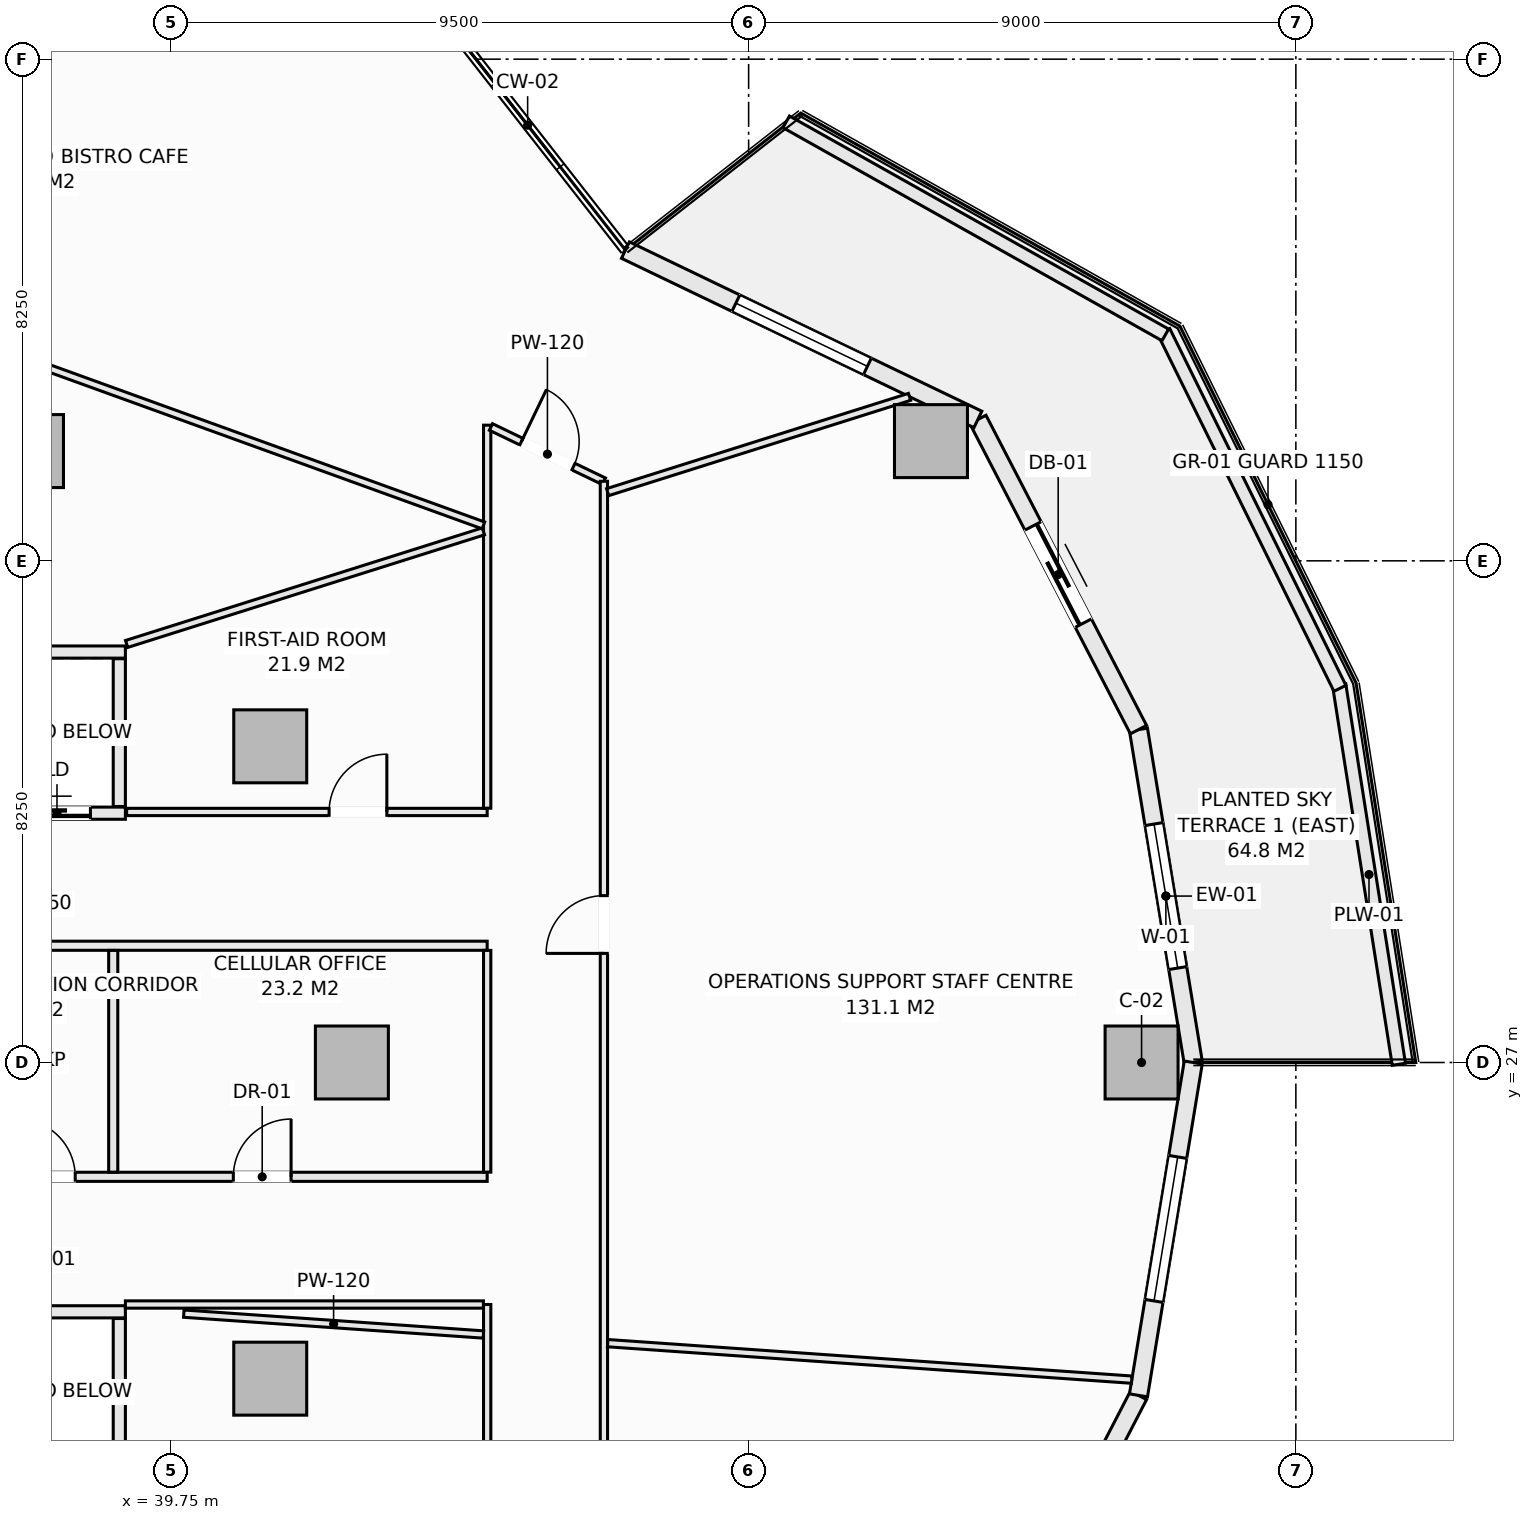
"""IFC4 building model, lengths in metres.
Left out: names, types, materials, properties, quantities, classifications, styles, units other than length and angle.
Written with IfcOpenShell. Run it as: python <this file> out.ifc"""

import sys

from ifc_helpers import new_model, si_unit, direction, frame, frame_2d, origin, origin_2d, place, context, subcontext, project, spatial, rectangle, extrude, element, fill, save


model = new_model("IFC4")
c1 = context("Model", 3, precision=1e-05, world=origin(), true_north=direction((0.0, 1.0)))
c2 = subcontext(c1, "Body", "Model", "MODEL_VIEW")
j1 = project(units=[si_unit("LENGTHUNIT", "METRE"), si_unit("PLANEANGLEUNIT", "RADIAN")], contexts=[c1])
p1 = place(None, origin())
s1 = spatial("IfcSite", under=j1, at=p1, CompositionType="ELEMENT")
p2 = place(p1, origin())
s2 = spatial("IfcBuilding", under=s1, at=p2, CompositionType="ELEMENT")
p3 = place(p2, frame((0.0, 0.0, 84.25)))
s3 = spatial("IfcBuildingStorey", under=s2, at=p3, CompositionType="ELEMENT", Elevation=84.25)
for number, where, z_axis, x_axis in (
    (1, (55.712, 27.0, -0.28), (0.0, 0.0, 1.0), (1.0, 0.0, 0.0)),
    (2, (52.249, 37.219, -0.28), (0.0, 0.0, 1.0), (1.0, 0.0, 0.0)),
    (3, (42.725, 27.0, -0.28), (0.0, 0.0, 1.0), (1.0, 0.0, 0.0)),
    (4, (41.382, 32.199, -0.28), (0.0, 0.0, 1.0), (1.0, 0.0, 0.0)),
    (5, (37.382, 37.055, -0.28), (0.0, 0.0, 1.0), (1.0, 0.0, 0.0)),
    (6, (41.382, 21.801, -0.28), (0.0, 0.0, 1.0), (1.0, 0.0, 0.0)),
):
    element("IfcColumn", number, at=place(p3, frame(where, z_axis=z_axis, x_axis=x_axis)), inside=s3, PredefinedType="COLUMN", context=c2, shape_type="SweptSolid", body=[
        extrude(rectangle(XDim=1.2, YDim=1.2, at=origin_2d()), origin(), (0.0, 0.0, 1.0), 3.85),
    ])
p4 = place(p3, frame((55.662, 32.474, 0.0), z_axis=(0.0, 0.0, 1.0), x_axis=(0.162386212206, -0.986727276447, 0.0)))
e7 = element("IfcWall", 7, at=p4, inside=s3, PredefinedType="SOLIDWALL", context=c2, shape_type="SweptSolid", body=[
    extrude(rectangle(XDim=5.548, YDim=0.3, at=frame_2d((2.774, 0.0))), origin(), (0.0, 0.0, 1.0), 3.093),
])
p5 = place(p4, frame((1.574, 0.0, 0.85)))
e8 = element("IfcOpeningElement", 8, at=p5, cuts=e7, PredefinedType="OPENING", context=c2, shape_type="SweptSolid", body=[
    extrude(rectangle(XDim=2.4, YDim=1.9, at=frame_2d((1.2, 0.95))), frame((0.0, 0.16, 0.0), z_axis=(0.0, -1.0, 0.0), x_axis=(1.0, 0.0, 0.0)), (0.0, 0.0, 1.0), 0.32),
])
p6 = place(p3, frame((53.021, 37.575, 0.0), z_axis=(0.0, 0.0, 1.0), x_axis=(0.459800981414, -0.888021991558, 0.0)))
e9 = element("IfcWall", 9, at=p6, inside=s3, PredefinedType="SOLIDWALL", context=c2, shape_type="SweptSolid", body=[
    extrude(rectangle(XDim=5.744, YDim=0.3, at=frame_2d((2.872, 0.0))), origin(), (0.0, 0.0, 1.0), 3.093),
])
p7 = place(p6, frame((1.972, 0.0, 0.0)))
e10 = element("IfcOpeningElement", 10, at=p7, cuts=e9, PredefinedType="OPENING", context=c2, shape_type="SweptSolid", body=[
    extrude(rectangle(XDim=1.8, YDim=2.25, at=frame_2d((0.9, 1.125))), frame((0.0, 0.16, 0.0), z_axis=(0.0, -1.0, 0.0), x_axis=(1.0, 0.0, 0.0)), (0.0, 0.0, 1.0), 0.32),
])
p8 = place(p3, frame((47.224, 40.36, 0.0), z_axis=(0.0, 0.0, 1.0), x_axis=(0.901354747727, -0.433081538224, 0.0)))
e11 = element("IfcWall", 11, at=p8, inside=s3, PredefinedType="SOLIDWALL", context=c2, shape_type="SweptSolid", body=[
    extrude(rectangle(XDim=6.431, YDim=0.3, at=frame_2d((3.215, 0.0))), origin(), (0.0, 0.0, 1.0), 3.093),
])
p9 = place(p8, frame((2.015, 0.0, 0.85)))
e12 = element("IfcOpeningElement", 12, at=p9, cuts=e11, PredefinedType="OPENING", context=c2, shape_type="SweptSolid", body=[
    extrude(rectangle(XDim=2.4, YDim=1.9, at=frame_2d((1.2, 0.95))), frame((0.0, 0.16, 0.0), z_axis=(0.0, -1.0, 0.0), x_axis=(1.0, 0.0, 0.0)), (0.0, 0.0, 1.0), 0.32),
])
p10 = place(p3, frame((53.021, 16.425, 0.0), z_axis=(0.0, 0.0, 1.0), x_axis=(0.459800981414, 0.888021991558, 0.0)))
e13 = element("IfcWall", 13, at=p10, inside=s3, PredefinedType="SOLIDWALL", context=c2, shape_type="SweptSolid", body=[
    extrude(rectangle(XDim=5.744, YDim=0.3, at=frame_2d((2.872, 0.0))), origin(), (0.0, 0.0, 1.0), 3.093),
])
p11 = place(p10, frame((1.672, 0.0, 0.85)))
e14 = element("IfcOpeningElement", 14, at=p11, cuts=e13, PredefinedType="OPENING", context=c2, shape_type="SweptSolid", body=[
    extrude(rectangle(XDim=2.4, YDim=1.9, at=frame_2d((1.2, 0.95))), frame((0.0, 0.16, 0.0), z_axis=(0.0, -1.0, 0.0), x_axis=(1.0, 0.0, 0.0)), (0.0, 0.0, 1.0), 0.32),
])
p12 = place(p3, frame((55.662, 21.526, 0.0), z_axis=(0.0, 0.0, 1.0), x_axis=(0.162386212206, 0.986727276447, 0.0)))
e15 = element("IfcWall", 15, at=p12, inside=s3, PredefinedType="SOLIDWALL", context=c2, shape_type="SweptSolid", body=[
    extrude(rectangle(XDim=5.548, YDim=0.3, at=frame_2d((2.774, 0.0))), origin(), (0.0, 0.0, 1.0), 3.093),
])
p13 = place(p12, frame((1.574, 0.0, 0.85)))
e16 = element("IfcOpeningElement", 16, at=p13, cuts=e15, PredefinedType="OPENING", context=c2, shape_type="SweptSolid", body=[
    extrude(rectangle(XDim=2.4, YDim=1.9, at=frame_2d((1.2, 0.95))), frame((0.0, 0.16, 0.0), z_axis=(0.0, -1.0, 0.0), x_axis=(1.0, 0.0, 0.0)), (0.0, 0.0, 1.0), 0.32),
])
p14 = place(p3, frame((58.962, 33.212, 0.0), z_axis=(0.0, 0.0, 1.0), x_axis=(0.15545655238, -0.987842730561, 0.0)))
e17 = element("IfcWall", 17, at=p14, inside=s3, PredefinedType="PARAPET", context=c2, shape_type="SweptSolid", body=[
    extrude(rectangle(XDim=6.318, YDim=0.22, at=frame_2d((3.159, 0.0))), origin(), (0.0, 0.0, 1.0), 0.52),
])
p15 = place(p3, frame((56.077, 39.021, 0.0), z_axis=(0.0, 0.0, 1.0), x_axis=(0.442686636348, -0.89667638644, 0.0)))
e18 = element("IfcWall", 18, at=p15, inside=s3, PredefinedType="PARAPET", context=c2, shape_type="SweptSolid", body=[
    extrude(rectangle(XDim=6.545, YDim=0.22, at=frame_2d((3.272, 0.0))), origin(), (0.0, 0.0, 1.0), 0.52),
])
p16 = place(p3, frame((49.868, 42.469, 0.0), z_axis=(0.0, 0.0, 1.0), x_axis=(0.871775109335, -0.489906275468, 0.0)))
e19 = element("IfcWall", 19, at=p16, inside=s3, PredefinedType="PARAPET", context=c2, shape_type="SweptSolid", body=[
    extrude(rectangle(XDim=7.152, YDim=0.22, at=frame_2d((3.576, 0.0))), origin(), (0.0, 0.0, 1.0), 0.52),
])
p17 = place(p3, frame((36.75, 33.75, 0.0), z_axis=(0.0, 0.0, 1.0), x_axis=(1.0, 0.0, 0.0)))
e20 = element("IfcWall", 20, at=p17, inside=s3, PredefinedType="SOLIDWALL", context=c2, shape_type="SweptSolid", body=[
    extrude(rectangle(XDim=2.25, YDim=0.2, at=frame_2d((1.125, 0.0))), origin(), (0.0, 0.0, 1.0), 3.57),
])
p18 = place(p3, frame((36.75, 31.1, 0.0), z_axis=(0.0, 0.0, 1.0), x_axis=(1.0, 0.0, 0.0)))
e21 = element("IfcWall", 21, at=p18, inside=s3, PredefinedType="SOLIDWALL", context=c2, shape_type="SweptSolid", body=[
    extrude(rectangle(XDim=2.25, YDim=0.2, at=frame_2d((1.125, 0.0))), origin(), (0.0, 0.0, 1.0), 3.57),
])
p19 = place(p18, frame((0.575, 0.0, 0.0)))
e22 = element("IfcOpeningElement", 22, at=p19, cuts=e21, PredefinedType="OPENING", context=c2, shape_type="SweptSolid", body=[
    extrude(rectangle(XDim=1.1, YDim=2.2, at=frame_2d((0.55, 1.1))), frame((0.0, 0.11, 0.0), z_axis=(0.0, -1.0, 0.0), x_axis=(1.0, 0.0, 0.0)), (0.0, 0.0, 1.0), 0.22),
])
p20 = place(p3, frame((38.9, 31.21, 0.0), z_axis=(0.0, 0.0, 1.0), x_axis=(0.0, 1.0, 0.0)))
e23 = element("IfcWall", 23, at=p20, inside=s3, PredefinedType="SOLIDWALL", context=c2, shape_type="SweptSolid", body=[
    extrude(rectangle(XDim=2.43, YDim=0.2, at=frame_2d((1.215, 0.0))), origin(), (0.0, 0.0, 1.0), 3.57),
])
p21 = place(p3, frame((36.75, 22.9, 0.0), z_axis=(0.0, 0.0, 1.0), x_axis=(1.0, 0.0, 0.0)))
e24 = element("IfcWall", 24, at=p21, inside=s3, PredefinedType="SOLIDWALL", context=c2, shape_type="SweptSolid", body=[
    extrude(rectangle(XDim=2.25, YDim=0.2, at=frame_2d((1.125, 0.0))), origin(), (0.0, 0.0, 1.0), 3.57),
])
p22 = place(p3, frame((38.9, 20.36, 0.0), z_axis=(0.0, 0.0, 1.0), x_axis=(0.0, 1.0, 0.0)))
e25 = element("IfcWall", 25, at=p22, inside=s3, PredefinedType="SOLIDWALL", context=c2, shape_type="SweptSolid", body=[
    extrude(rectangle(XDim=2.43, YDim=0.2, at=frame_2d((1.215, 0.0))), origin(), (0.0, 0.0, 1.0), 3.57),
])
p23 = place(p3, frame((29.78, 25.12, 0.0), z_axis=(0.0, 0.0, 1.0), x_axis=(1.0, 0.0, 0.0)))
e26 = element("IfcWall", 26, at=p23, inside=s3, PredefinedType="PARTITIONING", context=c2, shape_type="SweptSolid", body=[
    extrude(rectangle(XDim=15.17, YDim=0.15, at=frame_2d((7.585, 0.0))), origin(), (0.0, 0.0, 1.0), 3.57),
])
p24 = place(p23, frame((3.14, 0.0, 0.0)))
e27 = element("IfcOpeningElement", 27, at=p24, cuts=e26, PredefinedType="OPENING", context=c2, shape_type="SweptSolid", body=[
    extrude(rectangle(XDim=0.95, YDim=2.1, at=frame_2d((0.475, 1.05))), frame((0.0, 0.085, 0.0), z_axis=(0.0, -1.0, 0.0), x_axis=(1.0, 0.0, 0.0)), (0.0, 0.0, 1.0), 0.17),
])
p25 = place(p23, frame((7.445, 0.0, 0.0)))
e28 = element("IfcOpeningElement", 28, at=p25, cuts=e26, PredefinedType="OPENING", context=c2, shape_type="SweptSolid", body=[
    extrude(rectangle(XDim=0.95, YDim=2.1, at=frame_2d((0.475, 1.05))), frame((0.0, 0.085, 0.0), z_axis=(0.0, -1.0, 0.0), x_axis=(1.0, 0.0, 0.0)), (0.0, 0.0, 1.0), 0.17),
])
p26 = place(p23, frame((10.995, 0.0, 0.0)))
e29 = element("IfcOpeningElement", 29, at=p26, cuts=e26, PredefinedType="OPENING", context=c2, shape_type="SweptSolid", body=[
    extrude(rectangle(XDim=0.95, YDim=2.1, at=frame_2d((0.475, 1.05))), frame((0.0, 0.085, 0.0), z_axis=(0.0, -1.0, 0.0), x_axis=(1.0, 0.0, 0.0)), (0.0, 0.0, 1.0), 0.17),
])
p27 = place(p3, frame((30.077, 28.92, 0.0), z_axis=(0.0, 0.0, 1.0), x_axis=(1.0, 0.0, 0.0)))
e30 = element("IfcWall", 30, at=p27, inside=s3, PredefinedType="PARTITIONING", context=c2, shape_type="SweptSolid", body=[
    extrude(rectangle(XDim=14.873, YDim=0.15, at=frame_2d((7.437, 0.0))), origin(), (0.0, 0.0, 1.0), 3.57),
])
p28 = place(p3, frame((38.8, 25.197, 0.0), z_axis=(0.0, 0.0, 1.0), x_axis=(0.0, 1.0, 0.0)))
e31 = element("IfcWall", 31, at=p28, inside=s3, PredefinedType="PARTITIONING", context=c2, shape_type="SweptSolid", body=[
    extrude(rectangle(XDim=3.646, YDim=0.15, at=frame_2d((1.823, 0.0))), origin(), (0.0, 0.0, 1.0), 3.57),
])
p29 = place(p3, frame((39.02, 31.12, 0.0), z_axis=(0.0, 0.0, 1.0), x_axis=(1.0, 0.0, 0.0)))
e32 = element("IfcWall", 32, at=p29, inside=s3, PredefinedType="PARTITIONING", context=c2, shape_type="SweptSolid", body=[
    extrude(rectangle(XDim=5.93, YDim=0.12, at=frame_2d((2.965, 0.0))), origin(), (0.0, 0.0, 1.0), 3.57),
])
p30 = place(p29, frame((3.33, 0.0, 0.0)))
e33 = element("IfcOpeningElement", 33, at=p30, cuts=e32, PredefinedType="OPENING", context=c2, shape_type="SweptSolid", body=[
    extrude(rectangle(XDim=0.95, YDim=2.1, at=frame_2d((0.475, 1.05))), frame((0.0, 0.07, 0.0), z_axis=(0.0, -1.0, 0.0), x_axis=(1.0, 0.0, 0.0)), (0.0, 0.0, 1.0), 0.14),
])
p31 = place(p3, frame((44.95, 16.519, 0.0), z_axis=(0.0, 0.0, 1.0), x_axis=(0.0, 1.0, 0.0)))
e34 = element("IfcWall", 34, at=p31, inside=s3, PredefinedType="PARTITIONING", context=c2, shape_type="SweptSolid", body=[
    extrude(rectangle(XDim=6.501, YDim=0.12, at=frame_2d((3.25, 0.0))), origin(), (0.0, 0.0, 1.0), 3.57),
])
p32 = place(p3, frame((44.95, 25.197, 0.0), z_axis=(0.0, 0.0, 1.0), x_axis=(0.0, 1.0, 0.0)))
e35 = element("IfcWall", 35, at=p32, inside=s3, PredefinedType="PARTITIONING", context=c2, shape_type="SweptSolid", body=[
    extrude(rectangle(XDim=3.646, YDim=0.12, at=frame_2d((1.823, 0.0))), origin(), (0.0, 0.0, 1.0), 3.57),
])
p33 = place(p3, frame((44.95, 31.182, 0.0), z_axis=(0.0, 0.0, 1.0), x_axis=(0.0, 1.0, 0.0)))
e36 = element("IfcWall", 36, at=p33, inside=s3, PredefinedType="PARTITIONING", context=c2, shape_type="SweptSolid", body=[
    extrude(rectangle(XDim=6.299, YDim=0.12, at=frame_2d((3.149, 0.0))), origin(), (0.0, 0.0, 1.0), 3.57),
])
p34 = place(p3, frame((45.012, 37.451, 0.0), z_axis=(0.0, 0.0, 1.0), x_axis=(0.901304887575, -0.433185294803, 0.0)))
e37 = element("IfcWall", 37, at=p34, inside=s3, PredefinedType="PARTITIONING", context=c2, shape_type="SweptSolid", body=[
    extrude(rectangle(XDim=2.062, YDim=0.12, at=frame_2d((1.031, 0.0))), origin(), (0.0, 0.0, 1.0), 3.57),
])
p35 = place(p34, frame((0.556, 0.0, 0.0)))
e38 = element("IfcOpeningElement", 38, at=p35, cuts=e37, PredefinedType="OPENING", context=c2, shape_type="SweptSolid", body=[
    extrude(rectangle(XDim=0.95, YDim=2.1, at=frame_2d((0.475, 1.05))), frame((0.0, 0.07, 0.0), z_axis=(0.0, -1.0, 0.0), x_axis=(1.0, 0.0, 0.0)), (0.0, 0.0, 1.0), 0.14),
])
p36 = place(p3, frame((46.87, 17.442, 0.0), z_axis=(0.0, 0.0, 1.0), x_axis=(0.0, 1.0, 0.0)))
e39 = element("IfcWall", 39, at=p36, inside=s3, PredefinedType="PARTITIONING", context=c2, shape_type="SweptSolid", body=[
    extrude(rectangle(XDim=19.116, YDim=0.12, at=frame_2d((9.558, 0.0))), origin(), (0.0, 0.0, 1.0), 3.57),
])
p37 = place(p36, frame((11.352, 0.0, 0.0)))
e40 = element("IfcOpeningElement", 40, at=p37, cuts=e39, PredefinedType="OPENING", context=c2, shape_type="SweptSolid", body=[
    extrude(rectangle(XDim=0.95, YDim=2.1, at=frame_2d((0.475, 1.05))), frame((0.0, 0.07, 0.0), z_axis=(0.0, -1.0, 0.0), x_axis=(1.0, 0.0, 0.0)), (0.0, 0.0, 1.0), 0.14),
])
p38 = place(p3, frame((39.0, 23.02, 0.0), z_axis=(0.0, 0.0, 1.0), x_axis=(1.0, 0.0, 0.0)))
e41 = element("IfcWall", 41, at=p38, inside=s3, PredefinedType="PARTITIONING", context=c2, shape_type="SweptSolid", body=[
    extrude(rectangle(XDim=5.888, YDim=0.12, at=frame_2d((2.944, 0.0))), origin(), (0.0, 0.0, 1.0), 3.57),
])
p39 = place(p3, frame((39.961, 22.87, 0.0), z_axis=(0.0, 0.0, 1.0), x_axis=(0.99758211908, -0.069497594858, 0.0)))
e42 = element("IfcWall", 42, at=p39, inside=s3, PredefinedType="PARTITIONING", context=c2, shape_type="SweptSolid", body=[
    extrude(rectangle(XDim=4.939, YDim=0.12, at=frame_2d((2.47, 0.0))), origin(), (0.0, 0.0, 1.0), 3.57),
])
p40 = place(p3, frame((46.932, 22.385, 0.0), z_axis=(0.0, 0.0, 1.0), x_axis=(0.997586585682, -0.069433450639, 0.0)))
e43 = element("IfcWall", 43, at=p40, inside=s3, PredefinedType="PARTITIONING", context=c2, shape_type="SweptSolid", body=[
    extrude(rectangle(XDim=8.639, YDim=0.12, at=frame_2d((4.32, 0.0))), origin(), (0.0, 0.0, 1.0), 3.205),
])
p41 = place(p3, frame((39.02, 33.883, 0.0), z_axis=(0.0, 0.0, 1.0), x_axis=(0.953639615223, 0.300950966568, 0.0)))
e44 = element("IfcWall", 44, at=p41, inside=s3, PredefinedType="PARTITIONING", context=c2, shape_type="SweptSolid", body=[
    extrude(rectangle(XDim=6.153, YDim=0.12, at=frame_2d((3.077, 0.0))), origin(), (0.0, 0.0, 1.0), 3.57),
])
p42 = place(p3, frame((46.932, 36.38, 0.0), z_axis=(0.0, 0.0, 1.0), x_axis=(0.9536443078, 0.300936096541, 0.0)))
e45 = element("IfcWall", 45, at=p42, inside=s3, PredefinedType="PARTITIONING", context=c2, shape_type="SweptSolid", body=[
    extrude(rectangle(XDim=5.206, YDim=0.12, at=frame_2d((2.603, 0.0))), origin(), (0.0, 0.0, 1.0), 3.57),
])
p43 = place(p3, frame((18.06, 45.538, 0.0), z_axis=(0.0, 0.0, 1.0), x_axis=(0.940354559933, -0.340195975304, 0.0)))
e46 = element("IfcWall", 46, at=p43, inside=s3, PredefinedType="PARTITIONING", context=c2, shape_type="SweptSolid", body=[
    extrude(rectangle(XDim=28.53, YDim=0.12, at=frame_2d((14.265, 0.0))), origin(), (0.0, 0.0, 1.0), 3.093),
])
p44 = place(p5, origin())
e47 = element("IfcWindow", 47, at=p44, inside=s3, PartitioningType="SINGLE_PANEL", PredefinedType="WINDOW", context=c2, shape_type="SweptSolid", body=[
    extrude(rectangle(XDim=2.4, YDim=1.9, at=frame_2d((1.2, 0.95))), frame((0.0, 0.03, 0.0), z_axis=(0.0, -1.0, 0.0), x_axis=(1.0, 0.0, 0.0)), (0.0, 0.0, 1.0), 0.06),
])
fill(e8, e47)
p45 = place(p7, origin())
e48 = element("IfcDoor", 48, at=p45, inside=s3, OperationType="SLIDING_TO_LEFT", PredefinedType="DOOR", context=c2, shape_type="SweptSolid", body=[
    extrude(rectangle(XDim=1.8, YDim=2.25, at=frame_2d((0.9, 1.125))), frame((0.0, 0.025, 0.0), z_axis=(0.0, -1.0, 0.0), x_axis=(1.0, 0.0, 0.0)), (0.0, 0.0, 1.0), 0.05),
])
fill(e10, e48)
p46 = place(p9, origin())
e49 = element("IfcWindow", 49, at=p46, inside=s3, PartitioningType="SINGLE_PANEL", PredefinedType="WINDOW", context=c2, shape_type="SweptSolid", body=[
    extrude(rectangle(XDim=2.4, YDim=1.9, at=frame_2d((1.2, 0.95))), frame((0.0, 0.03, 0.0), z_axis=(0.0, -1.0, 0.0), x_axis=(1.0, 0.0, 0.0)), (0.0, 0.0, 1.0), 0.06),
])
fill(e12, e49)
p47 = place(p13, origin())
e50 = element("IfcWindow", 50, at=p47, inside=s3, PartitioningType="SINGLE_PANEL", PredefinedType="WINDOW", context=c2, shape_type="SweptSolid", body=[
    extrude(rectangle(XDim=2.4, YDim=1.9, at=frame_2d((1.2, 0.95))), frame((0.0, 0.03, 0.0), z_axis=(0.0, -1.0, 0.0), x_axis=(1.0, 0.0, 0.0)), (0.0, 0.0, 1.0), 0.06),
])
fill(e16, e50)
p48 = place(p19, origin())
e51 = element("IfcDoor", 51, at=p48, inside=s3, OperationType="SLIDING_TO_LEFT", PredefinedType="DOOR", context=c2, shape_type="SweptSolid", body=[
    extrude(rectangle(XDim=1.1, YDim=2.2, at=frame_2d((0.55, 1.1))), frame((0.0, 0.025, 0.0), z_axis=(0.0, -1.0, 0.0), x_axis=(1.0, 0.0, 0.0)), (0.0, 0.0, 1.0), 0.05),
])
fill(e22, e51)
p49 = place(p25, origin())
e52 = element("IfcDoor", 52, at=p49, inside=s3, OperationType="SINGLE_SWING_LEFT", PredefinedType="DOOR", context=c2, shape_type="SweptSolid", body=[
    extrude(rectangle(XDim=0.95, YDim=2.1, at=frame_2d((0.475, 1.05))), frame((0.0, 0.025, 0.0), z_axis=(0.0, -1.0, 0.0), x_axis=(1.0, 0.0, 0.0)), (0.0, 0.0, 1.0), 0.05),
])
fill(e28, e52)
p50 = place(p26, origin())
e53 = element("IfcDoor", 53, at=p50, inside=s3, OperationType="SINGLE_SWING_RIGHT", PredefinedType="DOOR", context=c2, shape_type="SweptSolid", body=[
    extrude(rectangle(XDim=0.95, YDim=2.1, at=frame_2d((0.475, 1.05))), frame((0.0, 0.025, 0.0), z_axis=(0.0, -1.0, 0.0), x_axis=(1.0, 0.0, 0.0)), (0.0, 0.0, 1.0), 0.05),
])
fill(e29, e53)
p51 = place(p37, origin())
e54 = element("IfcDoor", 54, at=p51, inside=s3, OperationType="SINGLE_SWING_LEFT", PredefinedType="DOOR", context=c2, shape_type="SweptSolid", body=[
    extrude(rectangle(XDim=0.95, YDim=2.1, at=frame_2d((0.475, 1.05))), frame((0.0, 0.025, 0.0), z_axis=(0.0, -1.0, 0.0), x_axis=(1.0, 0.0, 0.0)), (0.0, 0.0, 1.0), 0.05),
])
fill(e40, e54)
p52 = place(p30, origin())
e55 = element("IfcDoor", 55, at=p52, inside=s3, OperationType="SINGLE_SWING_RIGHT", PredefinedType="DOOR", context=c2, shape_type="SweptSolid", body=[
    extrude(rectangle(XDim=0.95, YDim=2.1, at=frame_2d((0.475, 1.05))), frame((0.0, 0.025, 0.0), z_axis=(0.0, -1.0, 0.0), x_axis=(1.0, 0.0, 0.0)), (0.0, 0.0, 1.0), 0.05),
])
fill(e33, e55)
p53 = place(p35, origin())
e56 = element("IfcDoor", 56, at=p53, inside=s3, OperationType="SINGLE_SWING_LEFT", PredefinedType="DOOR", context=c2, shape_type="SweptSolid", body=[
    extrude(rectangle(XDim=0.95, YDim=2.1, at=frame_2d((0.475, 1.05))), frame((0.0, 0.025, 0.0), z_axis=(0.0, -1.0, 0.0), x_axis=(1.0, 0.0, 0.0)), (0.0, 0.0, 1.0), 0.05),
])
fill(e38, e56)
save(model, sys.argv[1])
